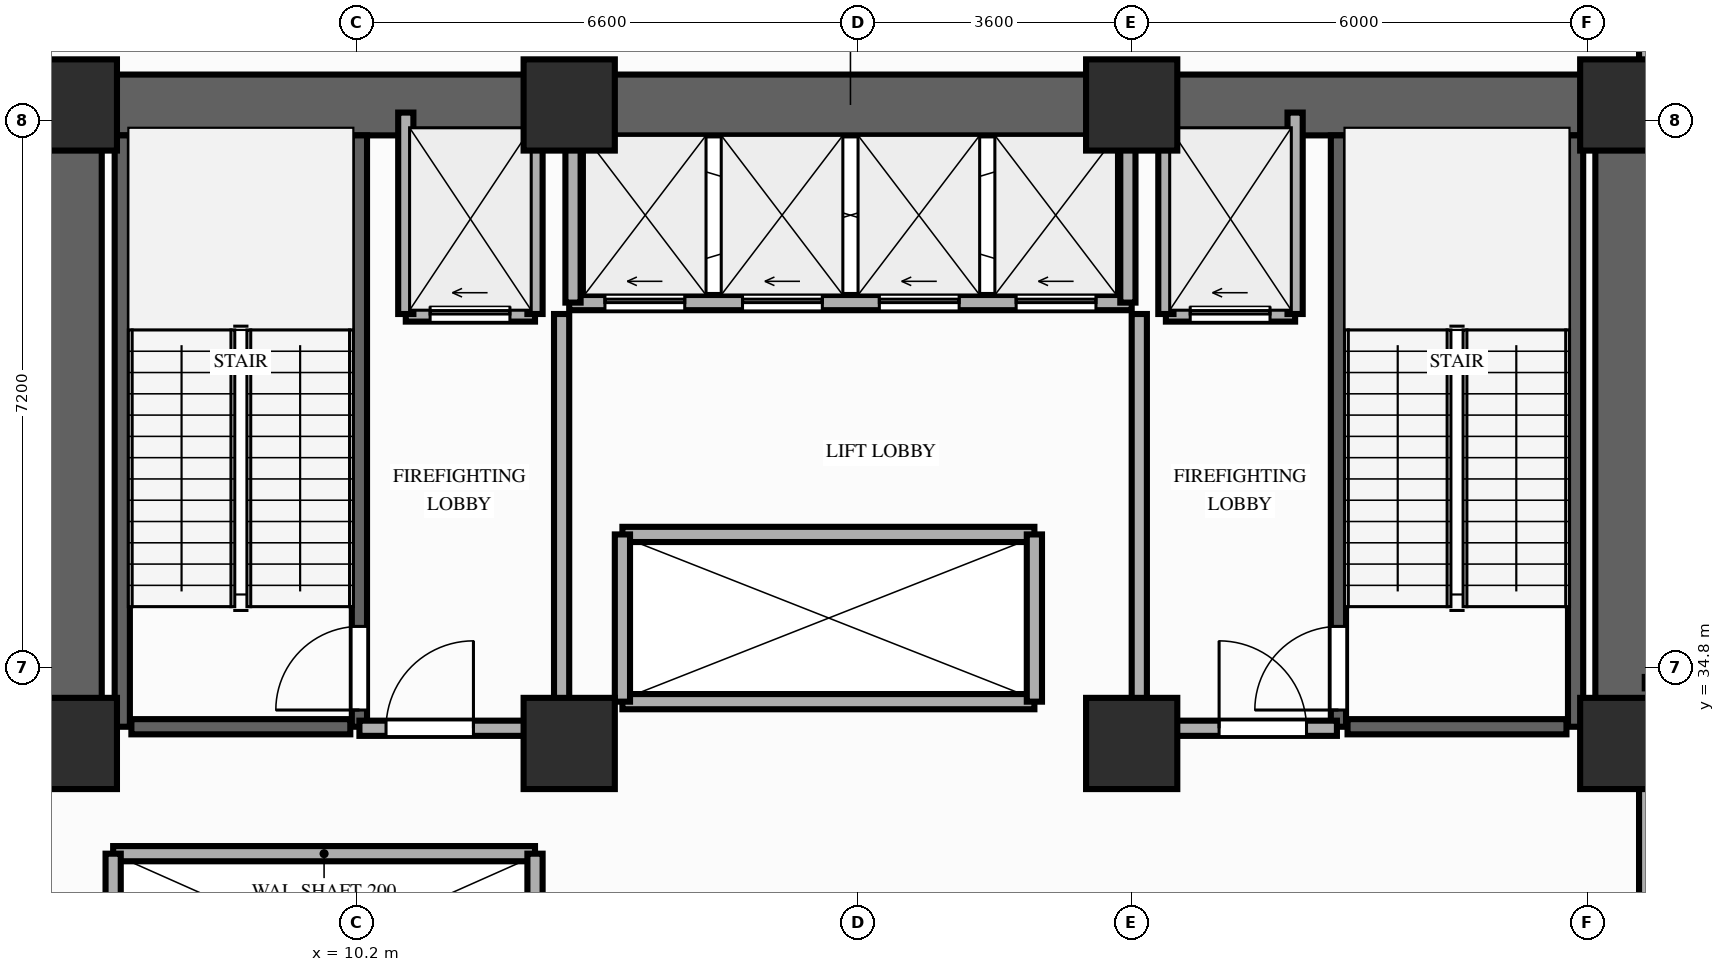
"""IFC4 building model, lengths in metres.
Left out: names, types, materials, properties, quantities, classifications, styles, units other than length and angle.
Written with IfcOpenShell. Run it as: python <this file> out.ifc"""

import sys

from ifc_helpers import new_model, si_unit, direction, frame, frame_2d, origin, origin_2d, place, context, subcontext, project, spatial, rectangle, extrude, element, fill, save


model = new_model("IFC4")
c1 = context("Model", 3, precision=1e-05, world=origin(), true_north=direction((0.0, 1.0)))
c2 = subcontext(c1, "Body", "Model", "MODEL_VIEW")
j1 = project(units=[si_unit("LENGTHUNIT", "METRE"), si_unit("PLANEANGLEUNIT", "RADIAN")], contexts=[c1])
p1 = place(None, origin())
s1 = spatial("IfcSite", under=j1, at=p1, CompositionType="ELEMENT")
p2 = place(p1, origin())
s2 = spatial("IfcBuilding", under=s1, at=p2, CompositionType="ELEMENT")
p3 = place(p2, frame((0.0, 0.0, 13.0)))
s3 = spatial("IfcBuildingStorey", under=s2, at=p3, CompositionType="ELEMENT", Elevation=13.0)
for number, where, z_axis, x_axis in (
    (1, (6.45, 33.8, 0.0), (0.0, 0.0, 1.0), (1.0, 0.0, 0.0)),
    (2, (13.0, 33.8, 0.0), (0.0, 0.0, 1.0), (1.0, 0.0, 0.0)),
    (3, (20.4, 33.8, 0.0), (0.0, 0.0, 1.0), (1.0, 0.0, 0.0)),
    (4, (26.9, 33.8, 0.0), (0.0, 0.0, 1.0), (1.0, 0.0, 0.0)),
    (5, (6.45, 42.2, 0.0), (0.0, 0.0, 1.0), (1.0, 0.0, 0.0)),
    (6, (13.0, 42.2, 0.0), (0.0, 0.0, 1.0), (1.0, 0.0, 0.0)),
    (7, (20.4, 42.2, 0.0), (0.0, 0.0, 1.0), (1.0, 0.0, 0.0)),
    (8, (26.9, 42.2, 0.0), (0.0, 0.0, 1.0), (1.0, 0.0, 0.0)),
):
    element("IfcColumn", number, at=place(p3, frame(where, z_axis=z_axis, x_axis=x_axis)), inside=s3, PredefinedType="COLUMN", context=c2, shape_type="SweptSolid", body=[
        extrude(rectangle(XDim=1.2, YDim=1.2, at=origin_2d()), origin(), (0.0, 0.0, 1.0), 4.6),
    ])
p4 = place(p3, frame((6.45, 42.2, 0.0), z_axis=(0.0, 0.0, 1.0), x_axis=(1.0, 0.0, 0.0)))
e9 = element("IfcWall", 9, at=p4, inside=s3, PredefinedType="SHEAR", context=c2, shape_type="SweptSolid", body=[
    extrude(rectangle(XDim=20.45, YDim=0.8, at=frame_2d((10.225, 0.0))), origin(), (0.0, 0.0, 1.0), 4.35),
])
for number, where, z_axis, x_axis in (
    (10, (6.45, 33.8, 0.0), (0.0, 0.0, 1.0), (0.0, 1.0, 0.0)),
    (11, (26.9, 33.8, 0.0), (0.0, 0.0, 1.0), (0.0, 1.0, 0.0)),
):
    element("IfcWall", number, at=place(p3, frame(where, z_axis=z_axis, x_axis=x_axis)), inside=s3, PredefinedType="SHEAR", context=c2, shape_type="SweptSolid", body=[
        extrude(rectangle(XDim=7.95, YDim=0.8, at=frame_2d((3.975, 0.0))), origin(), (0.0, 0.0, 1.0), 4.35),
    ])
p5 = place(p3, frame((7.12, 34.02, 0.0), z_axis=(0.0, 0.0, 1.0), x_axis=(0.0, 1.0, 0.0)))
e12 = element("IfcWall", 12, at=p5, inside=s3, PredefinedType="SHEAR", context=c2, shape_type="SweptSolid", body=[
    extrude(rectangle(XDim=7.78, YDim=0.2, at=frame_2d((3.89, 0.0))), origin(), (0.0, 0.0, 1.0), 4.35),
])
p6 = place(p3, frame((10.24, 34.02, 0.0), z_axis=(0.0, 0.0, 1.0), x_axis=(0.0, 1.0, 0.0)))
e13 = element("IfcWall", 13, at=p6, inside=s3, PredefinedType="SHEAR", context=c2, shape_type="SweptSolid", body=[
    extrude(rectangle(XDim=7.78, YDim=0.2, at=frame_2d((3.89, 0.0))), origin(), (0.0, 0.0, 1.0), 4.35),
])
p7 = place(p6, frame((0.22, 0.0, 0.0)))
e14 = element("IfcOpeningElement", 14, at=p7, cuts=e13, PredefinedType="OPENING", context=c2, shape_type="SweptSolid", body=[
    extrude(rectangle(XDim=1.1, YDim=2.15, at=frame_2d((0.55, 1.075))), frame((0.0, 0.11, 0.0), z_axis=(0.0, -1.0, 0.0), x_axis=(1.0, 0.0, 0.0)), (0.0, 0.0, 1.0), 0.22),
])
p8 = place(p3, frame((7.24, 34.02, 0.0), z_axis=(0.0, 0.0, 1.0), x_axis=(1.0, 0.0, 0.0)))
e15 = element("IfcWall", 15, at=p8, inside=s3, PredefinedType="SHEAR", context=c2, shape_type="SweptSolid", body=[
    extrude(rectangle(XDim=2.88, YDim=0.2, at=frame_2d((1.44, 0.0))), origin(), (0.0, 0.0, 1.0), 4.35),
])
p9 = place(p3, frame((23.12, 34.02, 0.0), z_axis=(0.0, 0.0, 1.0), x_axis=(0.0, 1.0, 0.0)))
e16 = element("IfcWall", 16, at=p9, inside=s3, PredefinedType="SHEAR", context=c2, shape_type="SweptSolid", body=[
    extrude(rectangle(XDim=7.78, YDim=0.2, at=frame_2d((3.89, 0.0))), origin(), (0.0, 0.0, 1.0), 4.35),
])
p10 = place(p9, frame((0.22, 0.0, 0.0)))
e17 = element("IfcOpeningElement", 17, at=p10, cuts=e16, PredefinedType="OPENING", context=c2, shape_type="SweptSolid", body=[
    extrude(rectangle(XDim=1.1, YDim=2.15, at=frame_2d((0.55, 1.075))), frame((0.0, 0.11, 0.0), z_axis=(0.0, -1.0, 0.0), x_axis=(1.0, 0.0, 0.0)), (0.0, 0.0, 1.0), 0.22),
])
p11 = place(p3, frame((26.24, 34.02, 0.0), z_axis=(0.0, 0.0, 1.0), x_axis=(0.0, 1.0, 0.0)))
e18 = element("IfcWall", 18, at=p11, inside=s3, PredefinedType="SHEAR", context=c2, shape_type="SweptSolid", body=[
    extrude(rectangle(XDim=7.78, YDim=0.2, at=frame_2d((3.89, 0.0))), origin(), (0.0, 0.0, 1.0), 4.35),
])
p12 = place(p3, frame((23.24, 34.02, 0.0), z_axis=(0.0, 0.0, 1.0), x_axis=(1.0, 0.0, 0.0)))
e19 = element("IfcWall", 19, at=p12, inside=s3, PredefinedType="SHEAR", context=c2, shape_type="SweptSolid", body=[
    extrude(rectangle(XDim=2.88, YDim=0.2, at=frame_2d((1.44, 0.0))), origin(), (0.0, 0.0, 1.0), 4.35),
])
p13 = place(p3, frame((7.0, 32.35, 0.0), z_axis=(0.0, 0.0, 1.0), x_axis=(1.0, 0.0, 0.0)))
e20 = element("IfcWall", 20, at=p13, inside=s3, PredefinedType="MOVABLE", context=c2, shape_type="SweptSolid", body=[
    extrude(rectangle(XDim=5.55, YDim=0.2, at=frame_2d((2.775, 0.0))), origin(), (0.0, 0.0, 1.0), 4.35),
])
for number, where, z_axis, x_axis in (
    (21, (7.0, 29.85, 0.0), (0.0, 0.0, 1.0), (0.0, 1.0, 0.0)),
    (22, (12.55, 29.85, 0.0), (0.0, 0.0, 1.0), (0.0, 1.0, 0.0)),
):
    element("IfcWall", number, at=place(p3, frame(where, z_axis=z_axis, x_axis=x_axis)), inside=s3, PredefinedType="MOVABLE", context=c2, shape_type="SweptSolid", body=[
        extrude(rectangle(XDim=2.5, YDim=0.2, at=frame_2d((1.25, 0.0))), origin(), (0.0, 0.0, 1.0), 4.35),
    ])
p14 = place(p3, frame((10.85, 39.45, 0.0), z_axis=(0.0, 0.0, 1.0), x_axis=(1.0, 0.0, 0.0)))
e23 = element("IfcWall", 23, at=p14, inside=s3, PredefinedType="MOVABLE", context=c2, shape_type="SweptSolid", body=[
    extrude(rectangle(XDim=1.7, YDim=0.2, at=frame_2d((0.85, 0.0))), origin(), (0.0, 0.0, 1.0), 4.35),
])
p15 = place(p14, frame((0.32, 0.0, 0.0)))
e24 = element("IfcOpeningElement", 24, at=p15, cuts=e23, PredefinedType="OPENING", context=c2, shape_type="SweptSolid", body=[
    extrude(rectangle(XDim=1.05, YDim=2.15, at=frame_2d((0.525, 1.075))), frame((0.0, 0.11, 0.0), z_axis=(0.0, -1.0, 0.0), x_axis=(1.0, 0.0, 0.0)), (0.0, 0.0, 1.0), 0.22),
])
p16 = place(p3, frame((20.85, 39.45, 0.0), z_axis=(0.0, 0.0, 1.0), x_axis=(1.0, 0.0, 0.0)))
e25 = element("IfcWall", 25, at=p16, inside=s3, PredefinedType="MOVABLE", context=c2, shape_type="SweptSolid", body=[
    extrude(rectangle(XDim=1.7, YDim=0.2, at=frame_2d((0.85, 0.0))), origin(), (0.0, 0.0, 1.0), 4.35),
])
p17 = place(p16, frame((0.32, 0.0, 0.0)))
e26 = element("IfcOpeningElement", 26, at=p17, cuts=e25, PredefinedType="OPENING", context=c2, shape_type="SweptSolid", body=[
    extrude(rectangle(XDim=1.05, YDim=2.15, at=frame_2d((0.525, 1.075))), frame((0.0, 0.11, 0.0), z_axis=(0.0, -1.0, 0.0), x_axis=(1.0, 0.0, 0.0)), (0.0, 0.0, 1.0), 0.22),
])
for number, where, z_axis, x_axis in (
    (27, (10.85, 39.45, 0.0), (0.0, 0.0, 1.0), (0.0, 1.0, 0.0)),
    (28, (12.55, 39.45, 0.0), (0.0, 0.0, 1.0), (0.0, 1.0, 0.0)),
):
    element("IfcWall", number, at=place(p3, frame(where, z_axis=z_axis, x_axis=x_axis)), inside=s3, PredefinedType="MOVABLE", context=c2, shape_type="SweptSolid", body=[
        extrude(rectangle(XDim=2.65, YDim=0.2, at=frame_2d((1.325, 0.0))), origin(), (0.0, 0.0, 1.0), 4.35),
    ])
p18 = place(p3, frame((12.9, 34.0, 0.0), z_axis=(0.0, 0.0, 1.0), x_axis=(0.0, 1.0, 0.0)))
e29 = element("IfcWall", 29, at=p18, inside=s3, PredefinedType="PARTITIONING", context=c2, shape_type="SweptSolid", body=[
    extrude(rectangle(XDim=5.45, YDim=0.2, at=frame_2d((2.725, 0.0))), origin(), (0.0, 0.0, 1.0), 3.63),
])
p19 = place(p3, frame((10.24, 34.0, 0.0), z_axis=(0.0, 0.0, 1.0), x_axis=(1.0, 0.0, 0.0)))
e30 = element("IfcWall", 30, at=p19, inside=s3, PredefinedType="PARTITIONING", context=c2, shape_type="SweptSolid", body=[
    extrude(rectangle(XDim=2.66, YDim=0.2, at=frame_2d((1.33, 0.0))), origin(), (0.0, 0.0, 1.0), 3.63),
])
p20 = place(p19, frame((0.35, 0.0, 0.0)))
e31 = element("IfcOpeningElement", 31, at=p20, cuts=e30, PredefinedType="OPENING", context=c2, shape_type="SweptSolid", body=[
    extrude(rectangle(XDim=1.15, YDim=2.15, at=frame_2d((0.575, 1.075))), frame((0.0, 0.11, 0.0), z_axis=(0.0, -1.0, 0.0), x_axis=(1.0, 0.0, 0.0)), (0.0, 0.0, 1.0), 0.22),
])
for number, where, z_axis, x_axis in (
    (32, (20.85, 39.45, 0.0), (0.0, 0.0, 1.0), (0.0, 1.0, 0.0)),
    (33, (22.55, 39.45, 0.0), (0.0, 0.0, 1.0), (0.0, 1.0, 0.0)),
):
    element("IfcWall", number, at=place(p3, frame(where, z_axis=z_axis, x_axis=x_axis)), inside=s3, PredefinedType="MOVABLE", context=c2, shape_type="SweptSolid", body=[
        extrude(rectangle(XDim=2.65, YDim=0.2, at=frame_2d((1.325, 0.0))), origin(), (0.0, 0.0, 1.0), 4.35),
    ])
p21 = place(p3, frame((20.5, 34.0, 0.0), z_axis=(0.0, 0.0, 1.0), x_axis=(0.0, 1.0, 0.0)))
e34 = element("IfcWall", 34, at=p21, inside=s3, PredefinedType="PARTITIONING", context=c2, shape_type="SweptSolid", body=[
    extrude(rectangle(XDim=5.45, YDim=0.2, at=frame_2d((2.725, 0.0))), origin(), (0.0, 0.0, 1.0), 3.63),
])
p22 = place(p3, frame((20.5, 34.0, 0.0), z_axis=(0.0, 0.0, 1.0), x_axis=(1.0, 0.0, 0.0)))
e35 = element("IfcWall", 35, at=p22, inside=s3, PredefinedType="PARTITIONING", context=c2, shape_type="SweptSolid", body=[
    extrude(rectangle(XDim=2.6, YDim=0.2, at=frame_2d((1.3, 0.0))), origin(), (0.0, 0.0, 1.0), 3.63),
])
p23 = place(p22, frame((1.05, 0.0, 0.0)))
e36 = element("IfcOpeningElement", 36, at=p23, cuts=e35, PredefinedType="OPENING", context=c2, shape_type="SweptSolid", body=[
    extrude(rectangle(XDim=1.15, YDim=2.15, at=frame_2d((0.575, 1.075))), frame((0.0, 0.11, 0.0), z_axis=(0.0, -1.0, 0.0), x_axis=(1.0, 0.0, 0.0)), (0.0, 0.0, 1.0), 0.22),
])
p24 = place(p3, frame((13.0, 39.6, 0.0), z_axis=(0.0, 0.0, 1.0), x_axis=(1.0, 0.0, 0.0)))
e37 = element("IfcWall", 37, at=p24, inside=s3, PredefinedType="MOVABLE", context=c2, shape_type="SweptSolid", body=[
    extrude(rectangle(XDim=7.4, YDim=0.2, at=frame_2d((3.7, 0.0))), origin(), (0.0, 0.0, 1.0), 4.35),
])
p25 = place(p24, frame((0.47, 0.0, 0.0)))
e38 = element("IfcOpeningElement", 38, at=p25, cuts=e37, PredefinedType="OPENING", context=c2, shape_type="SweptSolid", body=[
    extrude(rectangle(XDim=1.05, YDim=2.15, at=frame_2d((0.525, 1.075))), frame((0.0, 0.11, 0.0), z_axis=(0.0, -1.0, 0.0), x_axis=(1.0, 0.0, 0.0)), (0.0, 0.0, 1.0), 0.22),
])
p26 = place(p24, frame((2.28, 0.0, 0.0)))
e39 = element("IfcOpeningElement", 39, at=p26, cuts=e37, PredefinedType="OPENING", context=c2, shape_type="SweptSolid", body=[
    extrude(rectangle(XDim=1.05, YDim=2.15, at=frame_2d((0.525, 1.075))), frame((0.0, 0.11, 0.0), z_axis=(0.0, -1.0, 0.0), x_axis=(1.0, 0.0, 0.0)), (0.0, 0.0, 1.0), 0.22),
])
p27 = place(p24, frame((4.08, 0.0, 0.0)))
e40 = element("IfcOpeningElement", 40, at=p27, cuts=e37, PredefinedType="OPENING", context=c2, shape_type="SweptSolid", body=[
    extrude(rectangle(XDim=1.05, YDim=2.15, at=frame_2d((0.525, 1.075))), frame((0.0, 0.11, 0.0), z_axis=(0.0, -1.0, 0.0), x_axis=(1.0, 0.0, 0.0)), (0.0, 0.0, 1.0), 0.22),
])
p28 = place(p24, frame((5.88, 0.0, 0.0)))
e41 = element("IfcOpeningElement", 41, at=p28, cuts=e37, PredefinedType="OPENING", context=c2, shape_type="SweptSolid", body=[
    extrude(rectangle(XDim=1.05, YDim=2.15, at=frame_2d((0.525, 1.075))), frame((0.0, 0.11, 0.0), z_axis=(0.0, -1.0, 0.0), x_axis=(1.0, 0.0, 0.0)), (0.0, 0.0, 1.0), 0.22),
])
for number, where, z_axis, x_axis in (
    (42, (13.05, 39.6, 0.0), (0.0, 0.0, 1.0), (0.0, 1.0, 0.0)),
    (43, (20.35, 39.6, 0.0), (0.0, 0.0, 1.0), (0.0, 1.0, 0.0)),
):
    element("IfcWall", number, at=place(p3, frame(where, z_axis=z_axis, x_axis=x_axis)), inside=s3, PredefinedType="MOVABLE", context=c2, shape_type="SweptSolid", body=[
        extrude(rectangle(XDim=2.18, YDim=0.2, at=frame_2d((1.09, 0.0))), origin(), (0.0, 0.0, 1.0), 4.35),
    ])
for number, where, z_axis, x_axis in (
    (44, (13.7, 34.35, 0.0), (0.0, 0.0, 1.0), (1.0, 0.0, 0.0)),
    (45, (13.7, 36.55, 0.0), (0.0, 0.0, 1.0), (1.0, 0.0, 0.0)),
):
    element("IfcWall", number, at=place(p3, frame(where, z_axis=z_axis, x_axis=x_axis)), inside=s3, PredefinedType="MOVABLE", context=c2, shape_type="SweptSolid", body=[
        extrude(rectangle(XDim=5.42, YDim=0.2, at=frame_2d((2.71, 0.0))), origin(), (0.0, 0.0, 1.0), 4.35),
    ])
for number, where, z_axis, x_axis in (
    (46, (13.7, 34.35, 0.0), (0.0, 0.0, 1.0), (0.0, 1.0, 0.0)),
    (47, (19.12, 34.35, 0.0), (0.0, 0.0, 1.0), (0.0, 1.0, 0.0)),
):
    element("IfcWall", number, at=place(p3, frame(where, z_axis=z_axis, x_axis=x_axis)), inside=s3, PredefinedType="MOVABLE", context=c2, shape_type="SweptSolid", body=[
        extrude(rectangle(XDim=2.2, YDim=0.2, at=frame_2d((1.1, 0.0))), origin(), (0.0, 0.0, 1.0), 4.35),
    ])
p29 = place(p3, frame((27.15, 29.8, 0.0), z_axis=(0.0, 0.0, 1.0), x_axis=(0.0, 1.0, 0.0)))
e48 = element("IfcWall", 48, at=p29, inside=s3, PredefinedType="PARTITIONING", context=c2, shape_type="SweptSolid", body=[
    extrude(rectangle(XDim=3.85, YDim=0.15, at=frame_2d((1.925, 0.0))), origin(), (0.0, 0.0, 1.0), 3.63),
])
p30 = place(p3, frame((27.15, 42.65, 0.0), z_axis=(0.0, 0.0, 1.0), x_axis=(0.0, 1.0, 0.0)))
e49 = element("IfcWall", 49, at=p30, inside=s3, PredefinedType="PARTITIONING", context=c2, shape_type="SweptSolid", body=[
    extrude(rectangle(XDim=6.2, YDim=0.15, at=frame_2d((3.1, 0.0))), origin(), (0.0, 0.0, 1.0), 4.35),
])
p31 = place(p3, frame((27.15, 34.6, 0.0), z_axis=(0.0, 0.0, 1.0), x_axis=(1.0, 0.0, 0.0)))
e50 = element("IfcWall", 50, at=p31, inside=s3, PredefinedType="PARTITIONING", context=c2, shape_type="SweptSolid", body=[
    extrude(rectangle(XDim=7.85, YDim=0.15, at=frame_2d((3.925, 0.0))), origin(), (0.0, 0.0, 1.0), 3.63),
])
p32 = place(p7, origin())
e51 = element("IfcDoor", 51, at=p32, inside=s3, OperationType="SINGLE_SWING_LEFT", PredefinedType="DOOR", context=c2, shape_type="SweptSolid", body=[
    extrude(rectangle(XDim=1.1, YDim=2.15, at=frame_2d((0.55, 1.075))), frame((0.0, 0.025, 0.0), z_axis=(0.0, -1.0, 0.0), x_axis=(1.0, 0.0, 0.0)), (0.0, 0.0, 1.0), 0.05),
])
fill(e14, e51)
p33 = place(p10, origin())
e52 = element("IfcDoor", 52, at=p33, inside=s3, OperationType="SINGLE_SWING_LEFT", PredefinedType="DOOR", context=c2, shape_type="SweptSolid", body=[
    extrude(rectangle(XDim=1.1, YDim=2.15, at=frame_2d((0.55, 1.075))), frame((0.0, 0.025, 0.0), z_axis=(0.0, -1.0, 0.0), x_axis=(1.0, 0.0, 0.0)), (0.0, 0.0, 1.0), 0.05),
])
fill(e17, e52)
p34 = place(p15, origin())
e53 = element("IfcDoor", 53, at=p34, inside=s3, OperationType="SLIDING_TO_LEFT", PredefinedType="DOOR", context=c2, shape_type="SweptSolid", body=[
    extrude(rectangle(XDim=1.05, YDim=2.15, at=frame_2d((0.525, 1.075))), frame((0.0, 0.025, 0.0), z_axis=(0.0, -1.0, 0.0), x_axis=(1.0, 0.0, 0.0)), (0.0, 0.0, 1.0), 0.05),
])
fill(e24, e53)
p35 = place(p17, origin())
e54 = element("IfcDoor", 54, at=p35, inside=s3, OperationType="SLIDING_TO_LEFT", PredefinedType="DOOR", context=c2, shape_type="SweptSolid", body=[
    extrude(rectangle(XDim=1.05, YDim=2.15, at=frame_2d((0.525, 1.075))), frame((0.0, 0.025, 0.0), z_axis=(0.0, -1.0, 0.0), x_axis=(1.0, 0.0, 0.0)), (0.0, 0.0, 1.0), 0.05),
])
fill(e26, e54)
p36 = place(p20, origin())
e55 = element("IfcDoor", 55, at=p36, inside=s3, OperationType="SINGLE_SWING_RIGHT", PredefinedType="DOOR", context=c2, shape_type="SweptSolid", body=[
    extrude(rectangle(XDim=1.15, YDim=2.15, at=frame_2d((0.575, 1.075))), frame((0.0, 0.025, 0.0), z_axis=(0.0, -1.0, 0.0), x_axis=(1.0, 0.0, 0.0)), (0.0, 0.0, 1.0), 0.05),
])
fill(e31, e55)
p37 = place(p23, origin())
e56 = element("IfcDoor", 56, at=p37, inside=s3, OperationType="SINGLE_SWING_LEFT", PredefinedType="DOOR", context=c2, shape_type="SweptSolid", body=[
    extrude(rectangle(XDim=1.15, YDim=2.15, at=frame_2d((0.575, 1.075))), frame((0.0, 0.025, 0.0), z_axis=(0.0, -1.0, 0.0), x_axis=(1.0, 0.0, 0.0)), (0.0, 0.0, 1.0), 0.05),
])
fill(e36, e56)
p38 = place(p25, origin())
e57 = element("IfcDoor", 57, at=p38, inside=s3, OperationType="SLIDING_TO_LEFT", PredefinedType="DOOR", context=c2, shape_type="SweptSolid", body=[
    extrude(rectangle(XDim=1.05, YDim=2.15, at=frame_2d((0.525, 1.075))), frame((0.0, 0.025, 0.0), z_axis=(0.0, -1.0, 0.0), x_axis=(1.0, 0.0, 0.0)), (0.0, 0.0, 1.0), 0.05),
])
fill(e38, e57)
p39 = place(p26, origin())
e58 = element("IfcDoor", 58, at=p39, inside=s3, OperationType="SLIDING_TO_LEFT", PredefinedType="DOOR", context=c2, shape_type="SweptSolid", body=[
    extrude(rectangle(XDim=1.05, YDim=2.15, at=frame_2d((0.525, 1.075))), frame((0.0, 0.025, 0.0), z_axis=(0.0, -1.0, 0.0), x_axis=(1.0, 0.0, 0.0)), (0.0, 0.0, 1.0), 0.05),
])
fill(e39, e58)
p40 = place(p27, origin())
e59 = element("IfcDoor", 59, at=p40, inside=s3, OperationType="SLIDING_TO_LEFT", PredefinedType="DOOR", context=c2, shape_type="SweptSolid", body=[
    extrude(rectangle(XDim=1.05, YDim=2.15, at=frame_2d((0.525, 1.075))), frame((0.0, 0.025, 0.0), z_axis=(0.0, -1.0, 0.0), x_axis=(1.0, 0.0, 0.0)), (0.0, 0.0, 1.0), 0.05),
])
fill(e40, e59)
p41 = place(p28, origin())
e60 = element("IfcDoor", 60, at=p41, inside=s3, OperationType="SLIDING_TO_LEFT", PredefinedType="DOOR", context=c2, shape_type="SweptSolid", body=[
    extrude(rectangle(XDim=1.05, YDim=2.15, at=frame_2d((0.525, 1.075))), frame((0.0, 0.025, 0.0), z_axis=(0.0, -1.0, 0.0), x_axis=(1.0, 0.0, 0.0)), (0.0, 0.0, 1.0), 0.05),
])
fill(e41, e60)
save(model, sys.argv[1])
